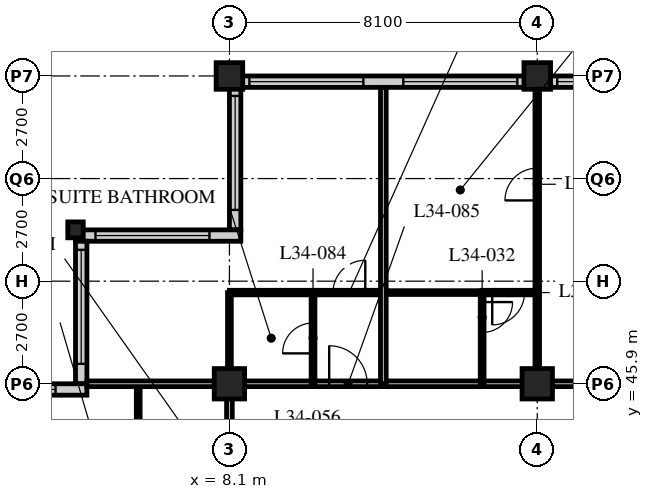
"""IFC4 building model, lengths in metres.
Left out: names, types, materials, properties, quantities, classifications, styles, units other than length and angle.
Written with IfcOpenShell. Run it as: python <this file> out.ifc"""

import sys

from ifc_helpers import new_model, si_unit, direction, frame, frame_2d, origin, origin_2d, place, context, subcontext, project, spatial, rectangle, hollow_rectangle, i_section, extrude, element, fill, save


model = new_model("IFC4")
c1 = context("Model", 3, precision=1e-05, world=origin(), true_north=direction((0.0, 1.0)))
c2 = subcontext(c1, "Body", "Model", "MODEL_VIEW")
j1 = project(units=[si_unit("LENGTHUNIT", "METRE"), si_unit("PLANEANGLEUNIT", "RADIAN")], contexts=[c1])
p1 = place(None, origin())
s1 = spatial("IfcSite", under=j1, at=p1, CompositionType="ELEMENT")
p2 = place(p1, origin())
s2 = spatial("IfcBuilding", under=s1, at=p2, CompositionType="ELEMENT")
p3 = place(p2, frame((0.0, 0.0, 134.0)))
s3 = spatial("IfcBuildingStorey", under=s2, at=p3, CompositionType="ELEMENT", Elevation=134.0)
p4 = place(p3, frame((4.05, 49.95, 0.0), z_axis=(0.0, 0.0, 1.0), x_axis=(1.0, 0.0, 0.0)))
e1 = element("IfcColumn", 1, at=p4, inside=s3, PredefinedType="COLUMN", context=c2, shape_type="SweptSolid", body=[
    extrude(i_section(OverallWidth=0.407, OverallDepth=0.419, WebThickness=0.031, FlangeThickness=0.049, FilletRadius=0.015, at=origin_2d()), origin(), (0.0, 0.0, 1.0), 3.4),
])
p5 = place(p3, frame((8.1, 45.9, 0.0), z_axis=(0.0, 0.0, 1.0), x_axis=(1.0, 0.0, 0.0)))
e2 = element("IfcColumn", 2, at=p5, inside=s3, PredefinedType="COLUMN", context=c2, shape_type="SweptSolid", body=[
    extrude(hollow_rectangle(XDim=0.8, YDim=0.8, WallThickness=0.08, at=origin_2d()), origin(), (0.0, 0.0, 1.0), 3.4),
])
p6 = place(p3, frame((8.1, 54.0, 0.0), z_axis=(0.0, 0.0, 1.0), x_axis=(1.0, 0.0, 0.0)))
e3 = element("IfcColumn", 3, at=p6, inside=s3, PredefinedType="COLUMN", context=c2, shape_type="SweptSolid", body=[
    extrude(hollow_rectangle(XDim=0.7, YDim=0.7, WallThickness=0.07, at=origin_2d()), origin(), (0.0, 0.0, 1.0), 3.4),
])
p7 = place(p3, frame((16.2, 45.9, 0.0), z_axis=(0.0, 0.0, 1.0), x_axis=(1.0, 0.0, 0.0)))
e4 = element("IfcColumn", 4, at=p7, inside=s3, PredefinedType="COLUMN", context=c2, shape_type="SweptSolid", body=[
    extrude(hollow_rectangle(XDim=0.8, YDim=0.8, WallThickness=0.08, at=origin_2d()), origin(), (0.0, 0.0, 1.0), 3.4),
])
p8 = place(p3, frame((16.2, 54.0, 0.0), z_axis=(0.0, 0.0, 1.0), x_axis=(1.0, 0.0, 0.0)))
e5 = element("IfcColumn", 5, at=p8, inside=s3, PredefinedType="COLUMN", context=c2, shape_type="SweptSolid", body=[
    extrude(hollow_rectangle(XDim=0.7, YDim=0.7, WallThickness=0.07, at=origin_2d()), origin(), (0.0, 0.0, 1.0), 3.4),
])
p9 = place(p3, frame((48.3, 53.85, 0.0), z_axis=(0.0, 0.0, 1.0), x_axis=(-1.0, 0.0, 0.0)))
e6 = element("IfcWall", 6, at=p9, inside=s3, PredefinedType="SOLIDWALL", context=c2, shape_type="SweptSolid", body=[
    extrude(rectangle(XDim=40.2, YDim=0.3, at=frame_2d((20.1, 0.0))), origin(), (0.0, 0.0, 1.0), 3.19),
])
p10 = place(p9, frame((0.225, 0.0, 0.9)))
e7 = element("IfcOpeningElement", 7, at=p10, cuts=e6, PredefinedType="OPENING", context=c2, shape_type="SweptSolid", body=[
    extrude(rectangle(XDim=3.0, YDim=2.0, at=frame_2d((1.5, 1.0))), frame((0.0, 0.16, 0.0), z_axis=(0.0, -1.0, 0.0), x_axis=(1.0, 0.0, 0.0)), (0.0, 0.0, 1.0), 0.32),
])
p11 = place(p9, frame((4.275, 0.0, 0.9)))
e8 = element("IfcOpeningElement", 8, at=p11, cuts=e6, PredefinedType="OPENING", context=c2, shape_type="SweptSolid", body=[
    extrude(rectangle(XDim=3.0, YDim=2.0, at=frame_2d((1.5, 1.0))), frame((0.0, 0.16, 0.0), z_axis=(0.0, -1.0, 0.0), x_axis=(1.0, 0.0, 0.0)), (0.0, 0.0, 1.0), 0.32),
])
p12 = place(p9, frame((8.325, 0.0, 0.9)))
e9 = element("IfcOpeningElement", 9, at=p12, cuts=e6, PredefinedType="OPENING", context=c2, shape_type="SweptSolid", body=[
    extrude(rectangle(XDim=3.0, YDim=2.0, at=frame_2d((1.5, 1.0))), frame((0.0, 0.16, 0.0), z_axis=(0.0, -1.0, 0.0), x_axis=(1.0, 0.0, 0.0)), (0.0, 0.0, 1.0), 0.32),
])
p13 = place(p9, frame((12.375, 0.0, 0.9)))
e10 = element("IfcOpeningElement", 10, at=p13, cuts=e6, PredefinedType="OPENING", context=c2, shape_type="SweptSolid", body=[
    extrude(rectangle(XDim=3.0, YDim=2.0, at=frame_2d((1.5, 1.0))), frame((0.0, 0.16, 0.0), z_axis=(0.0, -1.0, 0.0), x_axis=(1.0, 0.0, 0.0)), (0.0, 0.0, 1.0), 0.32),
])
p14 = place(p9, frame((16.425, 0.0, 0.9)))
e11 = element("IfcOpeningElement", 11, at=p14, cuts=e6, PredefinedType="OPENING", context=c2, shape_type="SweptSolid", body=[
    extrude(rectangle(XDim=3.0, YDim=2.0, at=frame_2d((1.5, 1.0))), frame((0.0, 0.16, 0.0), z_axis=(0.0, -1.0, 0.0), x_axis=(1.0, 0.0, 0.0)), (0.0, 0.0, 1.0), 0.32),
])
p15 = place(p9, frame((20.475, 0.0, 0.9)))
e12 = element("IfcOpeningElement", 12, at=p15, cuts=e6, PredefinedType="OPENING", context=c2, shape_type="SweptSolid", body=[
    extrude(rectangle(XDim=3.0, YDim=2.0, at=frame_2d((1.5, 1.0))), frame((0.0, 0.16, 0.0), z_axis=(0.0, -1.0, 0.0), x_axis=(1.0, 0.0, 0.0)), (0.0, 0.0, 1.0), 0.32),
])
p16 = place(p9, frame((24.525, 0.0, 0.9)))
e13 = element("IfcOpeningElement", 13, at=p16, cuts=e6, PredefinedType="OPENING", context=c2, shape_type="SweptSolid", body=[
    extrude(rectangle(XDim=3.0, YDim=2.0, at=frame_2d((1.5, 1.0))), frame((0.0, 0.16, 0.0), z_axis=(0.0, -1.0, 0.0), x_axis=(1.0, 0.0, 0.0)), (0.0, 0.0, 1.0), 0.32),
])
p17 = place(p9, frame((28.575, 0.0, 0.9)))
e14 = element("IfcOpeningElement", 14, at=p17, cuts=e6, PredefinedType="OPENING", context=c2, shape_type="SweptSolid", body=[
    extrude(rectangle(XDim=3.0, YDim=2.0, at=frame_2d((1.5, 1.0))), frame((0.0, 0.16, 0.0), z_axis=(0.0, -1.0, 0.0), x_axis=(1.0, 0.0, 0.0)), (0.0, 0.0, 1.0), 0.32),
])
p18 = place(p9, frame((32.625, 0.0, 0.9)))
e15 = element("IfcOpeningElement", 15, at=p18, cuts=e6, PredefinedType="OPENING", context=c2, shape_type="SweptSolid", body=[
    extrude(rectangle(XDim=3.0, YDim=2.0, at=frame_2d((1.5, 1.0))), frame((0.0, 0.16, 0.0), z_axis=(0.0, -1.0, 0.0), x_axis=(1.0, 0.0, 0.0)), (0.0, 0.0, 1.0), 0.32),
])
p19 = place(p9, frame((36.675, 0.0, 0.9)))
e16 = element("IfcOpeningElement", 16, at=p19, cuts=e6, PredefinedType="OPENING", context=c2, shape_type="SweptSolid", body=[
    extrude(rectangle(XDim=3.0, YDim=2.0, at=frame_2d((1.5, 1.0))), frame((0.0, 0.16, 0.0), z_axis=(0.0, -1.0, 0.0), x_axis=(1.0, 0.0, 0.0)), (0.0, 0.0, 1.0), 0.32),
])
p20 = place(p3, frame((8.25, 53.7, 0.0), z_axis=(0.0, 0.0, 1.0), x_axis=(0.0, -1.0, 0.0)))
e17 = element("IfcWall", 17, at=p20, inside=s3, PredefinedType="SOLIDWALL", context=c2, shape_type="SweptSolid", body=[
    extrude(rectangle(XDim=3.75, YDim=0.3, at=frame_2d((1.875, 0.0))), origin(), (0.0, 0.0, 1.0), 3.19),
])
p21 = place(p20, frame((0.225, 0.0, 0.9)))
e18 = element("IfcOpeningElement", 18, at=p21, cuts=e17, PredefinedType="OPENING", context=c2, shape_type="SweptSolid", body=[
    extrude(rectangle(XDim=3.0, YDim=1.5, at=frame_2d((1.5, 0.75))), frame((0.0, 0.16, 0.0), z_axis=(0.0, -1.0, 0.0), x_axis=(1.0, 0.0, 0.0)), (0.0, 0.0, 1.0), 0.32),
])
p22 = place(p3, frame((8.4, 49.8, 0.0), z_axis=(0.0, 0.0, 1.0), x_axis=(-1.0, 0.0, 0.0)))
e19 = element("IfcWall", 19, at=p22, inside=s3, PredefinedType="SOLIDWALL", context=c2, shape_type="SweptSolid", body=[
    extrude(rectangle(XDim=4.35, YDim=0.3, at=frame_2d((2.175, 0.0))), origin(), (0.0, 0.0, 1.0), 3.19),
])
p23 = place(p22, frame((0.825, 0.0, 0.9)))
e20 = element("IfcOpeningElement", 20, at=p23, cuts=e19, PredefinedType="OPENING", context=c2, shape_type="SweptSolid", body=[
    extrude(rectangle(XDim=3.0, YDim=1.5, at=frame_2d((1.5, 0.75))), frame((0.0, 0.16, 0.0), z_axis=(0.0, -1.0, 0.0), x_axis=(1.0, 0.0, 0.0)), (0.0, 0.0, 1.0), 0.32),
])
p24 = place(p3, frame((4.2, 49.65, 0.0), z_axis=(0.0, 0.0, 1.0), x_axis=(0.0, -1.0, 0.0)))
e21 = element("IfcWall", 21, at=p24, inside=s3, PredefinedType="SOLIDWALL", context=c2, shape_type="SweptSolid", body=[
    extrude(rectangle(XDim=3.75, YDim=0.3, at=frame_2d((1.875, 0.0))), origin(), (0.0, 0.0, 1.0), 3.19),
])
p25 = place(p24, frame((0.225, 0.0, 0.9)))
e22 = element("IfcOpeningElement", 22, at=p25, cuts=e21, PredefinedType="OPENING", context=c2, shape_type="SweptSolid", body=[
    extrude(rectangle(XDim=3.0, YDim=1.5, at=frame_2d((1.5, 0.75))), frame((0.0, 0.16, 0.0), z_axis=(0.0, -1.0, 0.0), x_axis=(1.0, 0.0, 0.0)), (0.0, 0.0, 1.0), 0.32),
])
p26 = place(p3, frame((4.35, 45.75, 0.0), z_axis=(0.0, 0.0, 1.0), x_axis=(-1.0, 0.0, 0.0)))
e23 = element("IfcWall", 23, at=p26, inside=s3, PredefinedType="SOLIDWALL", context=c2, shape_type="SweptSolid", body=[
    extrude(rectangle(XDim=4.35, YDim=0.3, at=frame_2d((2.175, 0.0))), origin(), (0.0, 0.0, 1.0), 3.19),
])
p27 = place(p26, frame((0.825, 0.0, 0.9)))
e24 = element("IfcOpeningElement", 24, at=p27, cuts=e23, PredefinedType="OPENING", context=c2, shape_type="SweptSolid", body=[
    extrude(rectangle(XDim=3.0, YDim=1.5, at=frame_2d((1.5, 0.75))), frame((0.0, 0.16, 0.0), z_axis=(0.0, -1.0, 0.0), x_axis=(1.0, 0.0, 0.0)), (0.0, 0.0, 1.0), 0.32),
])
p28 = place(p3, frame((8.1, 45.9, 0.0), z_axis=(0.0, 0.0, 1.0), x_axis=(1.0, 0.0, 0.0)))
e25 = element("IfcWall", 25, at=p28, inside=s3, PredefinedType="PARTITIONING", context=c2, shape_type="SweptSolid", body=[
    extrude(rectangle(XDim=36.45, YDim=0.15, at=frame_2d((18.225, 0.0))), origin(), (0.0, 0.0, 1.0), 2.578),
])
p29 = place(p28, frame((9.625, 0.0, 0.0)))
e26 = element("IfcOpeningElement", 26, at=p29, cuts=e25, PredefinedType="OPENING", context=c2, shape_type="SweptSolid", body=[
    extrude(rectangle(XDim=1.0, YDim=2.1, at=frame_2d((0.5, 1.05))), frame((0.0, 0.085, 0.0), z_axis=(0.0, -1.0, 0.0), x_axis=(1.0, 0.0, 0.0)), (0.0, 0.0, 1.0), 0.17),
])
p30 = place(p28, frame((21.775, 0.0, 0.0)))
e27 = element("IfcOpeningElement", 27, at=p30, cuts=e25, PredefinedType="OPENING", context=c2, shape_type="SweptSolid", body=[
    extrude(rectangle(XDim=1.0, YDim=2.1, at=frame_2d((0.5, 1.05))), frame((0.0, 0.085, 0.0), z_axis=(0.0, -1.0, 0.0), x_axis=(1.0, 0.0, 0.0)), (0.0, 0.0, 1.0), 0.17),
])
p31 = place(p28, frame((28.95, 0.0, 0.0)))
e28 = element("IfcOpeningElement", 28, at=p31, cuts=e25, PredefinedType="OPENING", context=c2, shape_type="SweptSolid", body=[
    extrude(rectangle(XDim=1.0, YDim=2.1, at=frame_2d((0.5, 1.05))), frame((0.0, 0.085, 0.0), z_axis=(0.0, -1.0, 0.0), x_axis=(1.0, 0.0, 0.0)), (0.0, 0.0, 1.0), 0.17),
])
p32 = place(p28, frame((33.925, 0.0, 0.0)))
e29 = element("IfcOpeningElement", 29, at=p32, cuts=e25, PredefinedType="OPENING", context=c2, shape_type="SweptSolid", body=[
    extrude(rectangle(XDim=1.0, YDim=2.1, at=frame_2d((0.5, 1.05))), frame((0.0, 0.085, 0.0), z_axis=(0.0, -1.0, 0.0), x_axis=(1.0, 0.0, 0.0)), (0.0, 0.0, 1.0), 0.17),
])
p33 = place(p28, frame((2.625, 0.0, 0.0)))
e30 = element("IfcOpeningElement", 30, at=p33, cuts=e25, PredefinedType="OPENING", context=c2, shape_type="SweptSolid", body=[
    extrude(rectangle(XDim=1.0, YDim=2.1, at=frame_2d((0.5, 1.05))), frame((0.0, 0.085, 0.0), z_axis=(0.0, -1.0, 0.0), x_axis=(1.0, 0.0, 0.0)), (0.0, 0.0, 1.0), 0.17),
])
p34 = place(p3, frame((8.1, 17.55, 0.0), z_axis=(0.0, 0.0, 1.0), x_axis=(0.0, 1.0, 0.0)))
e31 = element("IfcWall", 31, at=p34, inside=s3, PredefinedType="PARTITIONING", context=c2, shape_type="SweptSolid", body=[
    extrude(rectangle(XDim=28.35, YDim=0.15, at=frame_2d((14.175, 0.0))), origin(), (0.0, 0.0, 1.0), 2.578),
])
p35 = place(p34, frame((1.9, 0.0, 0.0)))
e32 = element("IfcOpeningElement", 32, at=p35, cuts=e31, PredefinedType="OPENING", context=c2, shape_type="SweptSolid", body=[
    extrude(rectangle(XDim=1.0, YDim=2.1, at=frame_2d((0.5, 1.05))), frame((0.0, 0.085, 0.0), z_axis=(0.0, -1.0, 0.0), x_axis=(1.0, 0.0, 0.0)), (0.0, 0.0, 1.0), 0.17),
])
p36 = place(p34, frame((10.0, 0.0, 0.0)))
e33 = element("IfcOpeningElement", 33, at=p36, cuts=e31, PredefinedType="OPENING", context=c2, shape_type="SweptSolid", body=[
    extrude(rectangle(XDim=1.0, YDim=2.1, at=frame_2d((0.5, 1.05))), frame((0.0, 0.085, 0.0), z_axis=(0.0, -1.0, 0.0), x_axis=(1.0, 0.0, 0.0)), (0.0, 0.0, 1.0), 0.17),
])
p37 = place(p34, frame((18.1, 0.0, 0.0)))
e34 = element("IfcOpeningElement", 34, at=p37, cuts=e31, PredefinedType="OPENING", context=c2, shape_type="SweptSolid", body=[
    extrude(rectangle(XDim=1.0, YDim=2.1, at=frame_2d((0.5, 1.05))), frame((0.0, 0.085, 0.0), z_axis=(0.0, -1.0, 0.0), x_axis=(1.0, 0.0, 0.0)), (0.0, 0.0, 1.0), 0.17),
])
p38 = place(p34, frame((24.9, 0.0, 0.0)))
e35 = element("IfcOpeningElement", 35, at=p38, cuts=e31, PredefinedType="OPENING", context=c2, shape_type="SweptSolid", body=[
    extrude(rectangle(XDim=1.0, YDim=2.1, at=frame_2d((0.5, 1.05))), frame((0.0, 0.085, 0.0), z_axis=(0.0, -1.0, 0.0), x_axis=(1.0, 0.0, 0.0)), (0.0, 0.0, 1.0), 0.17),
])
p39 = place(p3, frame((12.15, 48.3, 0.0), z_axis=(0.0, 0.0, 1.0), x_axis=(1.0, 0.0, 0.0)))
e36 = element("IfcWall", 36, at=p39, inside=s3, PredefinedType="PARTITIONING", context=c2, shape_type="SweptSolid", body=[
    extrude(rectangle(XDim=2.6, YDim=0.1, at=frame_2d((1.3, 0.0))), origin(), (0.0, 0.0, 1.0), 3.19),
])
p40 = place(p3, frame((14.75, 45.9, 0.0), z_axis=(0.0, 0.0, 1.0), x_axis=(0.0, 1.0, 0.0)))
e37 = element("IfcWall", 37, at=p40, inside=s3, PredefinedType="PARTITIONING", context=c2, shape_type="SweptSolid", body=[
    extrude(rectangle(XDim=2.4, YDim=0.1, at=frame_2d((1.2, 0.0))), origin(), (0.0, 0.0, 1.0), 3.19),
])
p41 = place(p40, frame((1.35, 0.0, 0.0)))
e38 = element("IfcOpeningElement", 38, at=p41, cuts=e37, PredefinedType="OPENING", context=c2, shape_type="SweptSolid", body=[
    extrude(rectangle(XDim=0.8, YDim=2.1, at=frame_2d((0.4, 1.05))), frame((0.0, 0.06, 0.0), z_axis=(0.0, -1.0, 0.0), x_axis=(1.0, 0.0, 0.0)), (0.0, 0.0, 1.0), 0.12),
])
p42 = place(p3, frame((16.2, 45.9, 0.0), z_axis=(0.0, 0.0, 1.0), x_axis=(0.0, 1.0, 0.0)))
e39 = element("IfcWall", 39, at=p42, inside=s3, PredefinedType="PARTITIONING", context=c2, shape_type="SweptSolid", body=[
    extrude(rectangle(XDim=7.8, YDim=0.12, at=frame_2d((3.9, 0.0))), origin(), (0.0, 0.0, 1.0), 2.578),
])
p43 = place(p42, frame((4.825, 0.0, 0.0)))
e40 = element("IfcOpeningElement", 40, at=p43, cuts=e39, PredefinedType="OPENING", context=c2, shape_type="SweptSolid", body=[
    extrude(rectangle(XDim=0.85, YDim=2.1, at=frame_2d((0.425, 1.05))), frame((0.0, 0.07, 0.0), z_axis=(0.0, -1.0, 0.0), x_axis=(1.0, 0.0, 0.0)), (0.0, 0.0, 1.0), 0.14),
])
p44 = place(p3, frame((5.7, 43.6, 0.0), z_axis=(0.0, 0.0, 1.0), x_axis=(0.0, 1.0, 0.0)))
e41 = element("IfcWall", 41, at=p44, inside=s3, PredefinedType="PARTITIONING", context=c2, shape_type="SweptSolid", body=[
    extrude(rectangle(XDim=2.3, YDim=0.1, at=frame_2d((1.15, 0.0))), origin(), (0.0, 0.0, 1.0), 3.19),
])
p45 = place(p3, frame((8.1, 48.3, 0.0), z_axis=(0.0, 0.0, 1.0), x_axis=(1.0, 0.0, 0.0)))
e42 = element("IfcWall", 42, at=p45, inside=s3, PredefinedType="PARTITIONING", context=c2, shape_type="SweptSolid", body=[
    extrude(rectangle(XDim=4.05, YDim=0.12, at=frame_2d((2.025, 0.0))), origin(), (0.0, 0.0, 1.0), 3.19),
])
p46 = place(p45, frame((2.725, 0.0, 0.0)))
e43 = element("IfcOpeningElement", 43, at=p46, cuts=e42, PredefinedType="OPENING", context=c2, shape_type="SweptSolid", body=[
    extrude(rectangle(XDim=0.85, YDim=2.1, at=frame_2d((0.425, 1.05))), frame((0.0, 0.07, 0.0), z_axis=(0.0, -1.0, 0.0), x_axis=(1.0, 0.0, 0.0)), (0.0, 0.0, 1.0), 0.14),
])
p47 = place(p3, frame((10.3, 45.9, 0.0), z_axis=(0.0, 0.0, 1.0), x_axis=(0.0, 1.0, 0.0)))
e44 = element("IfcWall", 44, at=p47, inside=s3, PredefinedType="PARTITIONING", context=c2, shape_type="SweptSolid", body=[
    extrude(rectangle(XDim=2.4, YDim=0.1, at=frame_2d((1.2, 0.0))), origin(), (0.0, 0.0, 1.0), 3.19),
])
p48 = place(p47, frame((0.8, 0.0, 0.0)))
e45 = element("IfcOpeningElement", 45, at=p48, cuts=e44, PredefinedType="OPENING", context=c2, shape_type="SweptSolid", body=[
    extrude(rectangle(XDim=0.8, YDim=2.1, at=frame_2d((0.4, 1.05))), frame((0.0, 0.06, 0.0), z_axis=(0.0, -1.0, 0.0), x_axis=(1.0, 0.0, 0.0)), (0.0, 0.0, 1.0), 0.12),
])
p49 = place(p3, frame((8.1, 45.9, 0.0), z_axis=(0.0, 0.0, 1.0), x_axis=(0.0, 1.0, 0.0)))
e46 = element("IfcWall", 46, at=p49, inside=s3, PredefinedType="PARTITIONING", context=c2, shape_type="SweptSolid", body=[
    extrude(rectangle(XDim=2.4, YDim=0.1, at=frame_2d((1.2, 0.0))), origin(), (0.0, 0.0, 1.0), 2.578),
])
p50 = place(p3, frame((4.35, 45.9, 0.0), z_axis=(0.0, 0.0, 1.0), x_axis=(1.0, 0.0, 0.0)))
e47 = element("IfcWall", 47, at=p50, inside=s3, PredefinedType="PARTITIONING", context=c2, shape_type="SweptSolid", body=[
    extrude(rectangle(XDim=3.75, YDim=0.15, at=frame_2d((1.875, 0.0))), origin(), (0.0, 0.0, 1.0), 2.578),
])
p51 = place(p3, frame((12.15, 45.9, 0.0), z_axis=(0.0, 0.0, 1.0), x_axis=(0.0, 1.0, 0.0)))
e48 = element("IfcWall", 48, at=p51, inside=s3, PredefinedType="PARTITIONING", context=c2, shape_type="SweptSolid", body=[
    extrude(rectangle(XDim=7.8, YDim=0.15, at=frame_2d((3.9, 0.0))), origin(), (0.0, 0.0, 1.0), 3.19),
])
p52 = place(p3, frame((14.74, 48.3, 0.0), z_axis=(0.0, 0.0, 1.0), x_axis=(1.0, 0.0, 0.0)))
e49 = element("IfcWall", 49, at=p52, inside=s3, PredefinedType="PARTITIONING", context=c2, shape_type="SweptSolid", body=[
    extrude(rectangle(XDim=1.46, YDim=0.12, at=frame_2d((0.73, 0.0))), origin(), (0.0, 0.0, 1.0), 3.19),
])
p53 = place(p52, frame((0.275, 0.0, 0.0)))
e50 = element("IfcOpeningElement", 50, at=p53, cuts=e49, PredefinedType="OPENING", context=c2, shape_type="SweptSolid", body=[
    extrude(rectangle(XDim=0.85, YDim=2.1, at=frame_2d((0.425, 1.05))), frame((0.0, 0.07, 0.0), z_axis=(0.0, -1.0, 0.0), x_axis=(1.0, 0.0, 0.0)), (0.0, 0.0, 1.0), 0.14),
])
p54 = place(p17, origin())
e51 = element("IfcWindow", 51, at=p54, inside=s3, PartitioningType="SINGLE_PANEL", PredefinedType="WINDOW", context=c2, shape_type="SweptSolid", body=[
    extrude(rectangle(XDim=3.0, YDim=2.0, at=frame_2d((1.5, 1.0))), frame((0.0, 0.03, 0.0), z_axis=(0.0, -1.0, 0.0), x_axis=(1.0, 0.0, 0.0)), (0.0, 0.0, 1.0), 0.06),
])
fill(e14, e51)
p55 = place(p18, origin())
e52 = element("IfcWindow", 52, at=p55, inside=s3, PartitioningType="SINGLE_PANEL", PredefinedType="WINDOW", context=c2, shape_type="SweptSolid", body=[
    extrude(rectangle(XDim=3.0, YDim=2.0, at=frame_2d((1.5, 1.0))), frame((0.0, 0.03, 0.0), z_axis=(0.0, -1.0, 0.0), x_axis=(1.0, 0.0, 0.0)), (0.0, 0.0, 1.0), 0.06),
])
fill(e15, e52)
p56 = place(p19, origin())
e53 = element("IfcWindow", 53, at=p56, inside=s3, PartitioningType="SINGLE_PANEL", PredefinedType="WINDOW", context=c2, shape_type="SweptSolid", body=[
    extrude(rectangle(XDim=3.0, YDim=2.0, at=frame_2d((1.5, 1.0))), frame((0.0, 0.03, 0.0), z_axis=(0.0, -1.0, 0.0), x_axis=(1.0, 0.0, 0.0)), (0.0, 0.0, 1.0), 0.06),
])
fill(e16, e53)
p57 = place(p21, origin())
e54 = element("IfcWindow", 54, at=p57, inside=s3, PartitioningType="SINGLE_PANEL", PredefinedType="WINDOW", context=c2, shape_type="SweptSolid", body=[
    extrude(rectangle(XDim=3.0, YDim=1.5, at=frame_2d((1.5, 0.75))), frame((0.0, 0.03, 0.0), z_axis=(0.0, -1.0, 0.0), x_axis=(1.0, 0.0, 0.0)), (0.0, 0.0, 1.0), 0.06),
])
fill(e18, e54)
p58 = place(p23, origin())
e55 = element("IfcWindow", 55, at=p58, inside=s3, PartitioningType="SINGLE_PANEL", PredefinedType="WINDOW", context=c2, shape_type="SweptSolid", body=[
    extrude(rectangle(XDim=3.0, YDim=1.5, at=frame_2d((1.5, 0.75))), frame((0.0, 0.03, 0.0), z_axis=(0.0, -1.0, 0.0), x_axis=(1.0, 0.0, 0.0)), (0.0, 0.0, 1.0), 0.06),
])
fill(e20, e55)
p59 = place(p25, origin())
e56 = element("IfcWindow", 56, at=p59, inside=s3, PartitioningType="SINGLE_PANEL", PredefinedType="WINDOW", context=c2, shape_type="SweptSolid", body=[
    extrude(rectangle(XDim=3.0, YDim=1.5, at=frame_2d((1.5, 0.75))), frame((0.0, 0.03, 0.0), z_axis=(0.0, -1.0, 0.0), x_axis=(1.0, 0.0, 0.0)), (0.0, 0.0, 1.0), 0.06),
])
fill(e22, e56)
p60 = place(p27, origin())
e57 = element("IfcWindow", 57, at=p60, inside=s3, PartitioningType="SINGLE_PANEL", PredefinedType="WINDOW", context=c2, shape_type="SweptSolid", body=[
    extrude(rectangle(XDim=3.0, YDim=1.5, at=frame_2d((1.5, 0.75))), frame((0.0, 0.03, 0.0), z_axis=(0.0, -1.0, 0.0), x_axis=(1.0, 0.0, 0.0)), (0.0, 0.0, 1.0), 0.06),
])
fill(e24, e57)
p61 = place(p41, origin())
e58 = element("IfcDoor", 58, at=p61, inside=s3, OperationType="SINGLE_SWING_LEFT", PredefinedType="DOOR", context=c2, shape_type="SweptSolid", body=[
    extrude(rectangle(XDim=0.8, YDim=2.1, at=frame_2d((0.4, 1.05))), frame((0.0, 0.025, 0.0), z_axis=(0.0, -1.0, 0.0), x_axis=(1.0, 0.0, 0.0)), (0.0, 0.0, 1.0), 0.05),
])
fill(e38, e58)
p62 = place(p43, origin())
e59 = element("IfcDoor", 59, at=p62, inside=s3, OperationType="SINGLE_SWING_LEFT", PredefinedType="DOOR", context=c2, shape_type="SweptSolid", body=[
    extrude(rectangle(XDim=0.85, YDim=2.1, at=frame_2d((0.425, 1.05))), frame((0.0, 0.025, 0.0), z_axis=(0.0, -1.0, 0.0), x_axis=(1.0, 0.0, 0.0)), (0.0, 0.0, 1.0), 0.05),
])
fill(e40, e59)
p63 = place(p48, origin())
e60 = element("IfcDoor", 60, at=p63, inside=s3, OperationType="SINGLE_SWING_LEFT", PredefinedType="DOOR", context=c2, shape_type="SweptSolid", body=[
    extrude(rectangle(XDim=0.8, YDim=2.1, at=frame_2d((0.4, 1.05))), frame((0.0, 0.025, 0.0), z_axis=(0.0, -1.0, 0.0), x_axis=(1.0, 0.0, 0.0)), (0.0, 0.0, 1.0), 0.05),
])
fill(e45, e60)
p64 = place(p33, origin())
e61 = element("IfcDoor", 61, at=p64, inside=s3, OperationType="SINGLE_SWING_LEFT", PredefinedType="DOOR", context=c2, shape_type="SweptSolid", body=[
    extrude(rectangle(XDim=1.0, YDim=2.1, at=frame_2d((0.5, 1.05))), frame((0.0, 0.025, 0.0), z_axis=(0.0, -1.0, 0.0), x_axis=(1.0, 0.0, 0.0)), (0.0, 0.0, 1.0), 0.05),
])
fill(e30, e61)
p65 = place(p46, origin())
e62 = element("IfcDoor", 62, at=p65, inside=s3, OperationType="SINGLE_SWING_RIGHT", PredefinedType="DOOR", context=c2, shape_type="SweptSolid", body=[
    extrude(rectangle(XDim=0.85, YDim=2.1, at=frame_2d((0.425, 1.05))), frame((0.0, 0.025, 0.0), z_axis=(0.0, -1.0, 0.0), x_axis=(1.0, 0.0, 0.0)), (0.0, 0.0, 1.0), 0.05),
])
fill(e43, e62)
p66 = place(p53, origin())
e63 = element("IfcDoor", 63, at=p66, inside=s3, OperationType="SINGLE_SWING_RIGHT", PredefinedType="DOOR", context=c2, shape_type="SweptSolid", body=[
    extrude(rectangle(XDim=0.85, YDim=2.1, at=frame_2d((0.425, 1.05))), frame((0.0, 0.025, 0.0), z_axis=(0.0, -1.0, 0.0), x_axis=(1.0, 0.0, 0.0)), (0.0, 0.0, 1.0), 0.05),
])
fill(e50, e63)
save(model, sys.argv[1])
